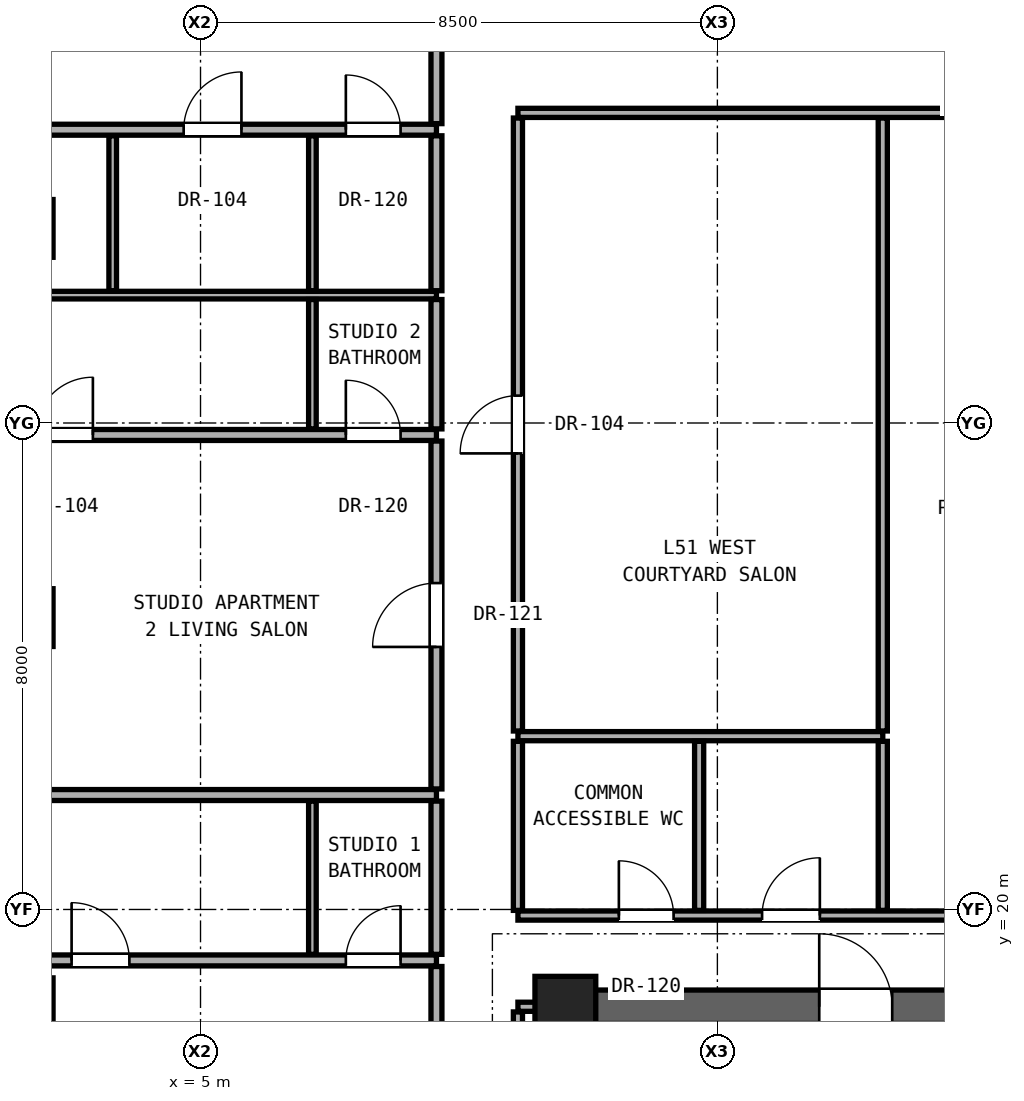
"""IFC4 building model, lengths in metres.
Left out: names, types, materials, properties, quantities, classifications, styles, units other than length and angle.
Written with IfcOpenShell. Run it as: python <this file> out.ifc"""

import sys

from ifc_helpers import new_model, si_unit, direction, frame, frame_2d, origin, origin_2d, place, context, subcontext, project, spatial, rectangle, hollow_rectangle, extrude, element, fill, save


model = new_model("IFC4")
c1 = context("Model", 3, precision=1e-05, world=origin(), true_north=direction((0.0, 1.0)))
c2 = subcontext(c1, "Body", "Model", "MODEL_VIEW")
j1 = project(units=[si_unit("LENGTHUNIT", "METRE"), si_unit("PLANEANGLEUNIT", "RADIAN")], contexts=[c1])
p1 = place(None, origin())
s1 = spatial("IfcSite", under=j1, at=p1, CompositionType="ELEMENT")
p2 = place(p1, origin())
s2 = spatial("IfcBuilding", under=s1, at=p2, CompositionType="ELEMENT")
p3 = place(p2, frame((0.0, 0.0, 180.4)))
s3 = spatial("IfcBuildingStorey", under=s2, at=p3, CompositionType="ELEMENT", Elevation=180.4)
p4 = place(p3, frame((11.0, 18.4, 0.0), z_axis=(0.0, 0.0, 1.0), x_axis=(1.0, 0.0, 0.0)))
e1 = element("IfcColumn", 1, at=p4, inside=s3, PredefinedType="COLUMN", context=c2, shape_type="SweptSolid", body=[
    extrude(rectangle(XDim=1.0, YDim=1.0, at=origin_2d()), origin(), (0.0, 0.0, 1.0), 3.25),
])
for number, where, z_axis, x_axis in (
    (2, (2.1, 18.4, 0.0), (0.0, 0.0, 1.0), (1.0, 0.0, 0.0)),
    (3, (2.1, 24.8, 0.0), (0.0, 0.0, 1.0), (1.0, 0.0, 0.0)),
    (4, (2.1, 31.2, 0.0), (0.0, 0.0, 1.0), (1.0, 0.0, 0.0)),
):
    element("IfcColumn", number, at=place(p3, frame(where, z_axis=z_axis, x_axis=x_axis)), inside=s3, PredefinedType="COLUMN", context=c2, shape_type="SweptSolid", body=[
        extrude(hollow_rectangle(XDim=0.95, YDim=0.95, WallThickness=0.05, at=origin_2d()), origin(), (0.0, 0.0, 1.0), 3.25),
    ])
p5 = place(p3, frame((11.0, 12.4, 0.0), z_axis=(0.0, 0.0, 1.0), x_axis=(0.0, 1.0, 0.0)))
e5 = element("IfcWall", 5, at=p5, inside=s3, PredefinedType="SHEAR", context=c2, shape_type="SweptSolid", body=[
    extrude(rectangle(XDim=6.0, YDim=0.55, at=frame_2d((3.0, 0.0))), origin(), (0.0, 0.0, 1.0), 3.05),
])
p6 = place(p3, frame((11.0, 18.4, 0.0), z_axis=(0.0, 0.0, 1.0), x_axis=(1.0, 0.0, 0.0)))
e6 = element("IfcWall", 6, at=p6, inside=s3, PredefinedType="SHEAR", context=c2, shape_type="SweptSolid", body=[
    extrude(rectangle(XDim=19.0, YDim=0.55, at=frame_2d((9.5, 0.0))), origin(), (0.0, 0.0, 1.0), 3.05),
])
p7 = place(p6, frame((4.175, 0.0, 0.0)))
e7 = element("IfcOpeningElement", 7, at=p7, cuts=e6, PredefinedType="OPENING", context=c2, shape_type="SweptSolid", body=[
    extrude(rectangle(XDim=1.2, YDim=2.25, at=frame_2d((0.6, 1.125))), frame((0.0, 0.285, 0.0), z_axis=(0.0, -1.0, 0.0), x_axis=(1.0, 0.0, 0.0)), (0.0, 0.0, 1.0), 0.57),
])
p8 = place(p6, frame((11.075, 0.0, 0.0)))
e8 = element("IfcOpeningElement", 8, at=p8, cuts=e6, PredefinedType="OPENING", context=c2, shape_type="SweptSolid", body=[
    extrude(rectangle(XDim=0.95, YDim=2.15, at=frame_2d((0.475, 1.075))), frame((0.0, 0.285, 0.0), z_axis=(0.0, -1.0, 0.0), x_axis=(1.0, 0.0, 0.0)), (0.0, 0.0, 1.0), 0.57),
])
p9 = place(p6, frame((14.3, 0.0, 0.0)))
e9 = element("IfcOpeningElement", 9, at=p9, cuts=e6, PredefinedType="OPENING", context=c2, shape_type="SweptSolid", body=[
    extrude(rectangle(XDim=1.3, YDim=2.3, at=frame_2d((0.65, 1.15))), frame((0.0, 0.285, 0.0), z_axis=(0.0, -1.0, 0.0), x_axis=(1.0, 0.0, 0.0)), (0.0, 0.0, 1.0), 0.57),
])
p10 = place(p6, frame((16.6, 0.0, 0.0)))
e10 = element("IfcOpeningElement", 10, at=p10, cuts=e6, PredefinedType="OPENING", context=c2, shape_type="SweptSolid", body=[
    extrude(rectangle(XDim=1.3, YDim=2.3, at=frame_2d((0.65, 1.15))), frame((0.0, 0.285, 0.0), z_axis=(0.0, -1.0, 0.0), x_axis=(1.0, 0.0, 0.0)), (0.0, 0.0, 1.0), 0.57),
])
p11 = place(p3, frame((10.22, 18.4, 0.0), z_axis=(0.0, 0.0, 1.0), x_axis=(1.0, 0.0, 0.0)))
e11 = element("IfcWall", 11, at=p11, inside=s3, PredefinedType="PARTITIONING", context=c2, shape_type="SweptSolid", body=[
    extrude(rectangle(XDim=0.51, YDim=0.15, at=frame_2d((0.255, 0.0))), origin(), (0.0, 0.0, 1.0), 2.442),
])
p12 = place(p3, frame((-1.37, 19.162, 0.0), z_axis=(0.0, 0.0, 1.0), x_axis=(1.0, 0.0, 0.0)))
e12 = element("IfcWall", 12, at=p12, inside=s3, PredefinedType="PARTITIONING", context=c2, shape_type="SweptSolid", body=[
    extrude(rectangle(XDim=10.25, YDim=0.18, at=frame_2d((5.125, 0.0))), origin(), (0.0, 0.0, 1.0), 2.269),
])
p13 = place(p12, frame((4.25, 0.0, 0.0)))
e13 = element("IfcOpeningElement", 13, at=p13, cuts=e12, PredefinedType="OPENING", context=c2, shape_type="SweptSolid", body=[
    extrude(rectangle(XDim=0.95, YDim=2.15, at=frame_2d((0.475, 1.075))), frame((0.0, 0.1, 0.0), z_axis=(0.0, -1.0, 0.0), x_axis=(1.0, 0.0, 0.0)), (0.0, 0.0, 1.0), 0.2),
])
p14 = place(p12, frame((8.76, 0.0, 0.0)))
e14 = element("IfcOpeningElement", 14, at=p14, cuts=e12, PredefinedType="OPENING", context=c2, shape_type="SweptSolid", body=[
    extrude(rectangle(XDim=0.9, YDim=2.1, at=frame_2d((0.45, 1.05))), frame((0.0, 0.1, 0.0), z_axis=(0.0, -1.0, 0.0), x_axis=(1.0, 0.0, 0.0)), (0.0, 0.0, 1.0), 0.2),
])
p15 = place(p3, frame((10.22, 19.9, 0.0), z_axis=(0.0, 0.0, 1.0), x_axis=(1.0, 0.0, 0.0)))
e15 = element("IfcWall", 15, at=p15, inside=s3, PredefinedType="PARTITIONING", context=c2, shape_type="SweptSolid", body=[
    extrude(rectangle(XDim=20.56, YDim=0.15, at=frame_2d((10.28, 0.0))), origin(), (0.0, 0.0, 1.0), 2.186),
])
p16 = place(p15, frame((1.66, 0.0, 0.0)))
e16 = element("IfcOpeningElement", 16, at=p16, cuts=e15, PredefinedType="OPENING", context=c2, shape_type="SweptSolid", body=[
    extrude(rectangle(XDim=0.9, YDim=2.1, at=frame_2d((0.45, 1.05))), frame((0.0, 0.085, 0.0), z_axis=(0.0, -1.0, 0.0), x_axis=(1.0, 0.0, 0.0)), (0.0, 0.0, 1.0), 0.17),
])
p17 = place(p15, frame((4.015, 0.0, 0.0)))
e17 = element("IfcOpeningElement", 17, at=p17, cuts=e15, PredefinedType="OPENING", context=c2, shape_type="SweptSolid", body=[
    extrude(rectangle(XDim=0.95, YDim=2.15, at=frame_2d((0.475, 1.075))), frame((0.0, 0.085, 0.0), z_axis=(0.0, -1.0, 0.0), x_axis=(1.0, 0.0, 0.0)), (0.0, 0.0, 1.0), 0.17),
])
p18 = place(p15, frame((7.905, 0.0, 0.0)))
e18 = element("IfcOpeningElement", 18, at=p18, cuts=e15, PredefinedType="OPENING", context=c2, shape_type="SweptSolid", body=[
    extrude(rectangle(XDim=0.85, YDim=2.01, at=frame_2d((0.425, 1.005))), frame((0.0, 0.085, 0.0), z_axis=(0.0, -1.0, 0.0), x_axis=(1.0, 0.0, 0.0)), (0.0, 0.0, 1.0), 0.17),
])
p19 = place(p3, frame((-1.37, 21.882, 0.0), z_axis=(0.0, 0.0, 1.0), x_axis=(1.0, 0.0, 0.0)))
e19 = element("IfcWall", 19, at=p19, inside=s3, PredefinedType="PARTITIONING", context=c2, shape_type="SweptSolid", body=[
    extrude(rectangle(XDim=10.25, YDim=0.18, at=frame_2d((5.125, 0.0))), origin(), (0.0, 0.0, 1.0), 2.269),
])
p20 = place(p3, frame((10.22, 22.85, 0.0), z_axis=(0.0, 0.0, 1.0), x_axis=(1.0, 0.0, 0.0)))
e20 = element("IfcWall", 20, at=p20, inside=s3, PredefinedType="PARTITIONING", context=c2, shape_type="SweptSolid", body=[
    extrude(rectangle(XDim=6.0, YDim=0.15, at=frame_2d((3.0, 0.0))), origin(), (0.0, 0.0, 1.0), 2.186),
])
p21 = place(p3, frame((-1.37, 27.803, 0.0), z_axis=(0.0, 0.0, 1.0), x_axis=(1.0, 0.0, 0.0)))
e21 = element("IfcWall", 21, at=p21, inside=s3, PredefinedType="PARTITIONING", context=c2, shape_type="SweptSolid", body=[
    extrude(rectangle(XDim=10.25, YDim=0.18, at=frame_2d((5.125, 0.0))), origin(), (0.0, 0.0, 1.0), 2.269),
])
p22 = place(p21, frame((3.65, 0.0, 0.0)))
e22 = element("IfcOpeningElement", 22, at=p22, cuts=e21, PredefinedType="OPENING", context=c2, shape_type="SweptSolid", body=[
    extrude(rectangle(XDim=0.95, YDim=2.15, at=frame_2d((0.475, 1.075))), frame((0.0, 0.1, 0.0), z_axis=(0.0, -1.0, 0.0), x_axis=(1.0, 0.0, 0.0)), (0.0, 0.0, 1.0), 0.2),
])
p23 = place(p21, frame((8.76, 0.0, 0.0)))
e23 = element("IfcOpeningElement", 23, at=p23, cuts=e21, PredefinedType="OPENING", context=c2, shape_type="SweptSolid", body=[
    extrude(rectangle(XDim=0.9, YDim=2.1, at=frame_2d((0.45, 1.05))), frame((0.0, 0.1, 0.0), z_axis=(0.0, -1.0, 0.0), x_axis=(1.0, 0.0, 0.0)), (0.0, 0.0, 1.0), 0.2),
])
p24 = place(p3, frame((-1.37, 30.103, 0.0), z_axis=(0.0, 0.0, 1.0), x_axis=(1.0, 0.0, 0.0)))
e24 = element("IfcWall", 24, at=p24, inside=s3, PredefinedType="PARTITIONING", context=c2, shape_type="SweptSolid", body=[
    extrude(rectangle(XDim=10.25, YDim=0.125, at=frame_2d((5.125, 0.0))), origin(), (0.0, 0.0, 1.0), 2.269),
])
p25 = place(p3, frame((-1.37, 32.823, 0.0), z_axis=(0.0, 0.0, 1.0), x_axis=(1.0, 0.0, 0.0)))
e25 = element("IfcWall", 25, at=p25, inside=s3, PredefinedType="PARTITIONING", context=c2, shape_type="SweptSolid", body=[
    extrude(rectangle(XDim=10.25, YDim=0.18, at=frame_2d((5.125, 0.0))), origin(), (0.0, 0.0, 1.0), 2.269),
])
p26 = place(p25, frame((1.708, 0.0, 0.0)))
e26 = element("IfcOpeningElement", 26, at=p26, cuts=e25, PredefinedType="OPENING", context=c2, shape_type="SweptSolid", body=[
    extrude(rectangle(XDim=0.95, YDim=2.15, at=frame_2d((0.475, 1.075))), frame((0.0, 0.1, 0.0), z_axis=(0.0, -1.0, 0.0), x_axis=(1.0, 0.0, 0.0)), (0.0, 0.0, 1.0), 0.2),
])
p27 = place(p25, frame((6.093, 0.0, 0.0)))
e27 = element("IfcOpeningElement", 27, at=p27, cuts=e25, PredefinedType="OPENING", context=c2, shape_type="SweptSolid", body=[
    extrude(rectangle(XDim=0.95, YDim=2.15, at=frame_2d((0.475, 1.075))), frame((0.0, 0.1, 0.0), z_axis=(0.0, -1.0, 0.0), x_axis=(1.0, 0.0, 0.0)), (0.0, 0.0, 1.0), 0.2),
])
p28 = place(p25, frame((8.76, 0.0, 0.0)))
e28 = element("IfcOpeningElement", 28, at=p28, cuts=e25, PredefinedType="OPENING", context=c2, shape_type="SweptSolid", body=[
    extrude(rectangle(XDim=0.9, YDim=2.1, at=frame_2d((0.45, 1.05))), frame((0.0, 0.1, 0.0), z_axis=(0.0, -1.0, 0.0), x_axis=(1.0, 0.0, 0.0)), (0.0, 0.0, 1.0), 0.2),
])
p29 = place(p3, frame((10.22, 33.1, 0.0), z_axis=(0.0, 0.0, 1.0), x_axis=(1.0, 0.0, 0.0)))
e29 = element("IfcWall", 29, at=p29, inside=s3, PredefinedType="PARTITIONING", context=c2, shape_type="SweptSolid", body=[
    extrude(rectangle(XDim=20.56, YDim=0.15, at=frame_2d((10.28, 0.0))), origin(), (0.0, 0.0, 1.0), 2.186),
])
p30 = place(p29, frame((12.782, 0.0, 0.0)))
e30 = element("IfcOpeningElement", 30, at=p30, cuts=e29, PredefinedType="OPENING", context=c2, shape_type="SweptSolid", body=[
    extrude(rectangle(XDim=0.85, YDim=2.01, at=frame_2d((0.425, 1.005))), frame((0.0, 0.085, 0.0), z_axis=(0.0, -1.0, 0.0), x_axis=(1.0, 0.0, 0.0)), (0.0, 0.0, 1.0), 0.17),
])
p31 = place(p29, frame((17.712, 0.0, 0.0)))
e31 = element("IfcOpeningElement", 31, at=p31, cuts=e29, PredefinedType="OPENING", context=c2, shape_type="SweptSolid", body=[
    extrude(rectangle(XDim=0.85, YDim=2.01, at=frame_2d((0.425, 1.005))), frame((0.0, 0.085, 0.0), z_axis=(0.0, -1.0, 0.0), x_axis=(1.0, 0.0, 0.0)), (0.0, 0.0, 1.0), 0.17),
])
p32 = place(p3, frame((3.556, 30.176, 0.0), z_axis=(0.0, 0.0, 1.0), x_axis=(0.0, 1.0, 0.0)))
e32 = element("IfcWall", 32, at=p32, inside=s3, PredefinedType="PARTITIONING", context=c2, shape_type="SweptSolid", body=[
    extrude(rectangle(XDim=2.547, YDim=0.125, at=frame_2d((1.274, 0.0))), origin(), (0.0, 0.0, 1.0), 2.346),
])
p33 = place(p3, frame((6.84, 19.262, 0.0), z_axis=(0.0, 0.0, 1.0), x_axis=(0.0, 1.0, 0.0)))
e33 = element("IfcWall", 33, at=p33, inside=s3, PredefinedType="PARTITIONING", context=c2, shape_type="SweptSolid", body=[
    extrude(rectangle(XDim=2.52, YDim=0.125, at=frame_2d((1.26, 0.0))), origin(), (0.0, 0.0, 1.0), 3.05),
])
p34 = place(p3, frame((6.84, 27.903, 0.0), z_axis=(0.0, 0.0, 1.0), x_axis=(0.0, 1.0, 0.0)))
e34 = element("IfcWall", 34, at=p34, inside=s3, PredefinedType="PARTITIONING", context=c2, shape_type="SweptSolid", body=[
    extrude(rectangle(XDim=2.127, YDim=0.125, at=frame_2d((1.064, 0.0))), origin(), (0.0, 0.0, 1.0), 3.05),
])
p35 = place(p3, frame((6.84, 30.176, 0.0), z_axis=(0.0, 0.0, 1.0), x_axis=(0.0, 1.0, 0.0)))
e35 = element("IfcWall", 35, at=p35, inside=s3, PredefinedType="PARTITIONING", context=c2, shape_type="SweptSolid", body=[
    extrude(rectangle(XDim=2.547, YDim=0.125, at=frame_2d((1.274, 0.0))), origin(), (0.0, 0.0, 1.0), 2.346),
])
p36 = place(p3, frame((8.88, 14.391, 0.0), z_axis=(0.0, 0.0, 1.0), x_axis=(0.0, 1.0, 0.0)))
e36 = element("IfcWall", 36, at=p36, inside=s3, PredefinedType="PARTITIONING", context=c2, shape_type="SweptSolid", body=[
    extrude(rectangle(XDim=4.671, YDim=0.18, at=frame_2d((2.335, 0.0))), origin(), (0.0, 0.0, 1.0), 2.442),
])
p37 = place(p36, frame((2.41, 0.0, 0.0)))
e37 = element("IfcOpeningElement", 37, at=p37, cuts=e36, PredefinedType="OPENING", context=c2, shape_type="SweptSolid", body=[
    extrude(rectangle(XDim=1.05, YDim=2.2, at=frame_2d((0.525, 1.1))), frame((0.0, 0.1, 0.0), z_axis=(0.0, -1.0, 0.0), x_axis=(1.0, 0.0, 0.0)), (0.0, 0.0, 1.0), 0.2),
])
p38 = place(p3, frame((8.88, 19.262, 0.0), z_axis=(0.0, 0.0, 1.0), x_axis=(0.0, 1.0, 0.0)))
e38 = element("IfcWall", 38, at=p38, inside=s3, PredefinedType="PARTITIONING", context=c2, shape_type="SweptSolid", body=[
    extrude(rectangle(XDim=2.52, YDim=0.18, at=frame_2d((1.26, 0.0))), origin(), (0.0, 0.0, 1.0), 3.05),
])
p39 = place(p3, frame((8.88, 21.982, 0.0), z_axis=(0.0, 0.0, 1.0), x_axis=(0.0, 1.0, 0.0)))
e39 = element("IfcWall", 39, at=p39, inside=s3, PredefinedType="PARTITIONING", context=c2, shape_type="SweptSolid", body=[
    extrude(rectangle(XDim=5.721, YDim=0.18, at=frame_2d((2.86, 0.0))), origin(), (0.0, 0.0, 1.0), 2.346),
])
p40 = place(p39, frame((2.335, 0.0, 0.0)))
e40 = element("IfcOpeningElement", 40, at=p40, cuts=e39, PredefinedType="OPENING", context=c2, shape_type="SweptSolid", body=[
    extrude(rectangle(XDim=1.05, YDim=2.2, at=frame_2d((0.525, 1.1))), frame((0.0, 0.1, 0.0), z_axis=(0.0, -1.0, 0.0), x_axis=(1.0, 0.0, 0.0)), (0.0, 0.0, 1.0), 0.2),
])
p41 = place(p3, frame((8.88, 27.903, 0.0), z_axis=(0.0, 0.0, 1.0), x_axis=(0.0, 1.0, 0.0)))
e41 = element("IfcWall", 41, at=p41, inside=s3, PredefinedType="PARTITIONING", context=c2, shape_type="SweptSolid", body=[
    extrude(rectangle(XDim=2.127, YDim=0.18, at=frame_2d((1.064, 0.0))), origin(), (0.0, 0.0, 1.0), 3.05),
])
p42 = place(p3, frame((8.88, 30.176, 0.0), z_axis=(0.0, 0.0, 1.0), x_axis=(0.0, 1.0, 0.0)))
e42 = element("IfcWall", 42, at=p42, inside=s3, PredefinedType="PARTITIONING", context=c2, shape_type="SweptSolid", body=[
    extrude(rectangle(XDim=2.547, YDim=0.18, at=frame_2d((1.274, 0.0))), origin(), (0.0, 0.0, 1.0), 2.346),
])
p43 = place(p3, frame((8.88, 32.923, 0.0), z_axis=(0.0, 0.0, 1.0), x_axis=(0.0, 1.0, 0.0)))
e43 = element("IfcWall", 43, at=p43, inside=s3, PredefinedType="PARTITIONING", context=c2, shape_type="SweptSolid", body=[
    extrude(rectangle(XDim=8.686, YDim=0.18, at=frame_2d((4.343, 0.0))), origin(), (0.0, 0.0, 1.0), 2.442),
])
p44 = place(p43, frame((3.818, 0.0, 0.0)))
e44 = element("IfcOpeningElement", 44, at=p44, cuts=e43, PredefinedType="OPENING", context=c2, shape_type="SweptSolid", body=[
    extrude(rectangle(XDim=1.05, YDim=2.2, at=frame_2d((0.525, 1.1))), frame((0.0, 0.1, 0.0), z_axis=(0.0, -1.0, 0.0), x_axis=(1.0, 0.0, 0.0)), (0.0, 0.0, 1.0), 0.2),
])
p45 = place(p3, frame((10.22, 12.335, 0.0), z_axis=(0.0, 0.0, 1.0), x_axis=(0.0, 1.0, 0.0)))
e45 = element("IfcWall", 45, at=p45, inside=s3, PredefinedType="PARTITIONING", context=c2, shape_type="SweptSolid", body=[
    extrude(rectangle(XDim=5.98, YDim=0.15, at=frame_2d((2.99, 0.0))), origin(), (0.0, 0.0, 1.0), 2.442),
])
p46 = place(p3, frame((10.22, 19.985, 0.0), z_axis=(0.0, 0.0, 1.0), x_axis=(0.0, 1.0, 0.0)))
e46 = element("IfcWall", 46, at=p46, inside=s3, PredefinedType="PARTITIONING", context=c2, shape_type="SweptSolid", body=[
    extrude(rectangle(XDim=2.78, YDim=0.15, at=frame_2d((1.39, 0.0))), origin(), (0.0, 0.0, 1.0), 3.05),
])
p47 = place(p3, frame((10.22, 22.935, 0.0), z_axis=(0.0, 0.0, 1.0), x_axis=(0.0, 1.0, 0.0)))
e47 = element("IfcWall", 47, at=p47, inside=s3, PredefinedType="PARTITIONING", context=c2, shape_type="SweptSolid", body=[
    extrude(rectangle(XDim=10.08, YDim=0.15, at=frame_2d((5.04, 0.0))), origin(), (0.0, 0.0, 1.0), 2.346),
])
p48 = place(p47, frame((4.565, 0.0, 0.0)))
e48 = element("IfcOpeningElement", 48, at=p48, cuts=e47, PredefinedType="OPENING", context=c2, shape_type="SweptSolid", body=[
    extrude(rectangle(XDim=0.95, YDim=2.15, at=frame_2d((0.475, 1.075))), frame((0.0, 0.085, 0.0), z_axis=(0.0, -1.0, 0.0), x_axis=(1.0, 0.0, 0.0)), (0.0, 0.0, 1.0), 0.17),
])
for number, where, z_axis, x_axis in (
    (49, (13.2, 19.985, 0.0), (0.0, 0.0, 1.0), (0.0, 1.0, 0.0)),
    (50, (16.22, 19.985, 0.0), (0.0, 0.0, 1.0), (0.0, 1.0, 0.0)),
):
    element("IfcWall", number, at=place(p3, frame(where, z_axis=z_axis, x_axis=x_axis)), inside=s3, PredefinedType="PARTITIONING", context=c2, shape_type="SweptSolid", body=[
        extrude(rectangle(XDim=2.78, YDim=0.15, at=frame_2d((1.39, 0.0))), origin(), (0.0, 0.0, 1.0), 3.05),
    ])
p49 = place(p3, frame((16.22, 22.935, 0.0), z_axis=(0.0, 0.0, 1.0), x_axis=(0.0, 1.0, 0.0)))
e51 = element("IfcWall", 51, at=p49, inside=s3, PredefinedType="PARTITIONING", context=c2, shape_type="SweptSolid", body=[
    extrude(rectangle(XDim=10.08, YDim=0.15, at=frame_2d((5.04, 0.0))), origin(), (0.0, 0.0, 1.0), 2.186),
])
p50 = place(p7, origin())
e52 = element("IfcDoor", 52, at=p50, inside=s3, OperationType="SINGLE_SWING_LEFT", PredefinedType="DOOR", context=c2, shape_type="SweptSolid", body=[
    extrude(rectangle(XDim=1.2, YDim=2.25, at=frame_2d((0.6, 1.125))), frame((0.0, 0.025, 0.0), z_axis=(0.0, -1.0, 0.0), x_axis=(1.0, 0.0, 0.0)), (0.0, 0.0, 1.0), 0.05),
])
fill(e7, e52)
p51 = place(p16, origin())
e53 = element("IfcDoor", 53, at=p51, inside=s3, OperationType="SINGLE_SWING_LEFT", PredefinedType="DOOR", context=c2, shape_type="SweptSolid", body=[
    extrude(rectangle(XDim=0.9, YDim=2.1, at=frame_2d((0.45, 1.05))), frame((0.0, 0.025, 0.0), z_axis=(0.0, -1.0, 0.0), x_axis=(1.0, 0.0, 0.0)), (0.0, 0.0, 1.0), 0.05),
])
fill(e16, e53)
p52 = place(p13, origin())
e54 = element("IfcDoor", 54, at=p52, inside=s3, OperationType="SINGLE_SWING_LEFT", PredefinedType="DOOR", context=c2, shape_type="SweptSolid", body=[
    extrude(rectangle(XDim=0.95, YDim=2.15, at=frame_2d((0.475, 1.075))), frame((0.0, 0.025, 0.0), z_axis=(0.0, -1.0, 0.0), x_axis=(1.0, 0.0, 0.0)), (0.0, 0.0, 1.0), 0.05),
])
fill(e13, e54)
p53 = place(p14, origin())
e55 = element("IfcDoor", 55, at=p53, inside=s3, OperationType="SINGLE_SWING_RIGHT", PredefinedType="DOOR", context=c2, shape_type="SweptSolid", body=[
    extrude(rectangle(XDim=0.9, YDim=2.1, at=frame_2d((0.45, 1.05))), frame((0.0, 0.025, 0.0), z_axis=(0.0, -1.0, 0.0), x_axis=(1.0, 0.0, 0.0)), (0.0, 0.0, 1.0), 0.05),
])
fill(e14, e55)
p54 = place(p40, origin())
e56 = element("IfcDoor", 56, at=p54, inside=s3, OperationType="SINGLE_SWING_LEFT", PredefinedType="DOOR", context=c2, shape_type="SweptSolid", body=[
    extrude(rectangle(XDim=1.05, YDim=2.2, at=frame_2d((0.525, 1.1))), frame((0.0, 0.025, 0.0), z_axis=(0.0, -1.0, 0.0), x_axis=(1.0, 0.0, 0.0)), (0.0, 0.0, 1.0), 0.05),
])
fill(e40, e56)
p55 = place(p22, origin())
e57 = element("IfcDoor", 57, at=p55, inside=s3, OperationType="SINGLE_SWING_RIGHT", PredefinedType="DOOR", context=c2, shape_type="SweptSolid", body=[
    extrude(rectangle(XDim=0.95, YDim=2.15, at=frame_2d((0.475, 1.075))), frame((0.0, 0.025, 0.0), z_axis=(0.0, -1.0, 0.0), x_axis=(1.0, 0.0, 0.0)), (0.0, 0.0, 1.0), 0.05),
])
fill(e22, e57)
p56 = place(p23, origin())
e58 = element("IfcDoor", 58, at=p56, inside=s3, OperationType="SINGLE_SWING_LEFT", PredefinedType="DOOR", context=c2, shape_type="SweptSolid", body=[
    extrude(rectangle(XDim=0.9, YDim=2.1, at=frame_2d((0.45, 1.05))), frame((0.0, 0.025, 0.0), z_axis=(0.0, -1.0, 0.0), x_axis=(1.0, 0.0, 0.0)), (0.0, 0.0, 1.0), 0.05),
])
fill(e23, e58)
p57 = place(p27, origin())
e59 = element("IfcDoor", 59, at=p57, inside=s3, OperationType="SINGLE_SWING_RIGHT", PredefinedType="DOOR", context=c2, shape_type="SweptSolid", body=[
    extrude(rectangle(XDim=0.95, YDim=2.15, at=frame_2d((0.475, 1.075))), frame((0.0, 0.025, 0.0), z_axis=(0.0, -1.0, 0.0), x_axis=(1.0, 0.0, 0.0)), (0.0, 0.0, 1.0), 0.05),
])
fill(e27, e59)
p58 = place(p28, origin())
e60 = element("IfcDoor", 60, at=p58, inside=s3, OperationType="SINGLE_SWING_LEFT", PredefinedType="DOOR", context=c2, shape_type="SweptSolid", body=[
    extrude(rectangle(XDim=0.9, YDim=2.1, at=frame_2d((0.45, 1.05))), frame((0.0, 0.025, 0.0), z_axis=(0.0, -1.0, 0.0), x_axis=(1.0, 0.0, 0.0)), (0.0, 0.0, 1.0), 0.05),
])
fill(e28, e60)
p59 = place(p17, origin())
e61 = element("IfcDoor", 61, at=p59, inside=s3, OperationType="SINGLE_SWING_RIGHT", PredefinedType="DOOR", context=c2, shape_type="SweptSolid", body=[
    extrude(rectangle(XDim=0.95, YDim=2.15, at=frame_2d((0.475, 1.075))), frame((0.0, 0.025, 0.0), z_axis=(0.0, -1.0, 0.0), x_axis=(1.0, 0.0, 0.0)), (0.0, 0.0, 1.0), 0.05),
])
fill(e17, e61)
p60 = place(p48, origin())
e62 = element("IfcDoor", 62, at=p60, inside=s3, OperationType="SINGLE_SWING_LEFT", PredefinedType="DOOR", context=c2, shape_type="SweptSolid", body=[
    extrude(rectangle(XDim=0.95, YDim=2.15, at=frame_2d((0.475, 1.075))), frame((0.0, 0.025, 0.0), z_axis=(0.0, -1.0, 0.0), x_axis=(1.0, 0.0, 0.0)), (0.0, 0.0, 1.0), 0.05),
])
fill(e48, e62)
save(model, sys.argv[1])
